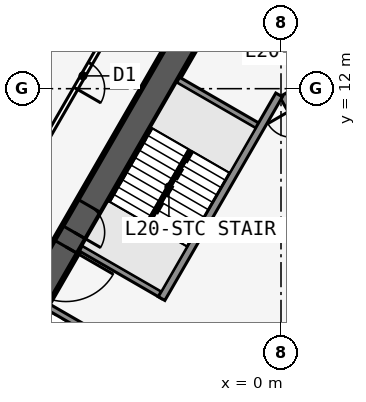
"""IFC4 building model, lengths in metres.
Left out: names, types, materials, properties, quantities, classifications, styles, units other than length and angle.
Written with IfcOpenShell. Run it as: python <this file> out.ifc"""

import sys

from ifc_helpers import new_model, si_unit, direction, frame, frame_2d, origin, place, context, subcontext, project, spatial, rectangle, extrude, element, fill, save


model = new_model("IFC4")
c1 = context("Model", 3, precision=1e-05, world=origin(), true_north=direction((0.0, 1.0)))
c2 = subcontext(c1, "Body", "Model", "MODEL_VIEW")
j1 = project(units=[si_unit("LENGTHUNIT", "METRE"), si_unit("PLANEANGLEUNIT", "RADIAN")], contexts=[c1])
p1 = place(None, origin())
s1 = spatial("IfcSite", under=j1, at=p1, CompositionType="ELEMENT")
p2 = place(p1, origin())
s2 = spatial("IfcBuilding", under=s1, at=p2, CompositionType="ELEMENT")
p3 = place(p2, frame((0.0, 0.0, 79.5)))
s3 = spatial("IfcBuildingStorey", under=s2, at=p3, CompositionType="ELEMENT", Elevation=79.5)
p4 = place(p3, frame((16.5, -9.526, 0.0), z_axis=(0.0, 0.0, 1.0), x_axis=(-0.499999749417, 0.866025548458, 0.0)))
e1 = element("IfcWall", 1, at=p4, inside=s3, PredefinedType="SHEAR", context=c2, shape_type="SweptSolid", body=[
    extrude(rectangle(XDim=33.0, YDim=0.9, at=frame_2d((16.5, 0.0))), origin(), (0.0, 0.0, 1.0), 3.4),
])
p5 = place(p4, frame((14.15, 0.0, 0.0)))
e2 = element("IfcOpeningElement", 2, at=p5, cuts=e1, PredefinedType="OPENING", context=c2, shape_type="SweptSolid", body=[
    extrude(rectangle(XDim=1.8, YDim=2.13, at=frame_2d((0.9, 1.065))), frame((0.0, 0.46, 0.0), z_axis=(0.0, -1.0, 0.0), x_axis=(1.0, 0.0, 0.0)), (0.0, 0.0, 1.0), 0.92),
])
p6 = place(p4, frame((12.6, 0.0, 0.0)))
e3 = element("IfcOpeningElement", 3, at=p6, cuts=e1, PredefinedType="OPENING", context=c2, shape_type="SweptSolid", body=[
    extrude(rectangle(XDim=1.0, YDim=2.13, at=frame_2d((0.5, 1.065))), frame((0.0, 0.46, 0.0), z_axis=(0.0, -1.0, 0.0), x_axis=(1.0, 0.0, 0.0)), (0.0, 0.0, 1.0), 0.92),
])
p7 = place(p3, frame((5.379, 2.586, 0.0), z_axis=(0.0, 0.0, 1.0), x_axis=(-0.500001375892, 0.866024609411, 0.0)))
e4 = element("IfcWall", 4, at=p7, inside=s3, PredefinedType="SOLIDWALL", context=c2, shape_type="SweptSolid", body=[
    extrude(rectangle(XDim=10.633, YDim=0.25, at=frame_2d((5.316, 0.0))), origin(), (0.0, 0.0, 1.0), 3.235),
])
p8 = place(p7, frame((9.164, 0.0, 0.0)))
e5 = element("IfcOpeningElement", 5, at=p8, cuts=e4, PredefinedType="OPENING", context=c2, shape_type="SweptSolid", body=[
    extrude(rectangle(XDim=0.9, YDim=2.13, at=frame_2d((0.45, 1.065))), frame((0.0, 0.135, 0.0), z_axis=(0.0, -1.0, 0.0), x_axis=(1.0, 0.0, 0.0)), (0.0, 0.0, 1.0), 0.27),
])
p9 = place(p7, frame((1.0, 0.0, 0.0)))
e6 = element("IfcOpeningElement", 6, at=p9, cuts=e4, PredefinedType="OPENING", context=c2, shape_type="SweptSolid", body=[
    extrude(rectangle(XDim=1.1, YDim=2.13, at=frame_2d((0.55, 1.065))), frame((0.0, 0.135, 0.0), z_axis=(0.0, -1.0, 0.0), x_axis=(1.0, 0.0, 0.0)), (0.0, 0.0, 1.0), 0.27),
])
p10 = place(p7, frame((3.9, 0.0, 0.0)))
e7 = element("IfcOpeningElement", 7, at=p10, cuts=e4, PredefinedType="OPENING", context=c2, shape_type="SweptSolid", body=[
    extrude(rectangle(XDim=1.1, YDim=2.13, at=frame_2d((0.55, 1.065))), frame((0.0, 0.135, 0.0), z_axis=(0.0, -1.0, 0.0), x_axis=(1.0, 0.0, 0.0)), (0.0, 0.0, 1.0), 0.27),
])
p11 = place(p7, frame((6.8, 0.0, 0.0)))
e8 = element("IfcOpeningElement", 8, at=p11, cuts=e4, PredefinedType="OPENING", context=c2, shape_type="SweptSolid", body=[
    extrude(rectangle(XDim=1.1, YDim=2.13, at=frame_2d((0.55, 1.065))), frame((0.0, 0.135, 0.0), z_axis=(0.0, -1.0, 0.0), x_axis=(1.0, 0.0, 0.0)), (0.0, 0.0, 1.0), 0.27),
])
p12 = place(p3, frame((0.0, 19.052, 0.0), z_axis=(0.0, 0.0, 1.0), x_axis=(-0.499999749417, -0.866025548458, 0.0)))
e9 = element("IfcWall", 9, at=p12, inside=s3, PredefinedType="SHEAR", context=c2, shape_type="SweptSolid", body=[
    extrude(rectangle(XDim=33.0, YDim=0.9, at=frame_2d((16.5, 0.0))), origin(), (0.0, 0.0, 1.0), 3.4),
])
p13 = place(p12, frame((14.15, 0.0, 0.0)))
e10 = element("IfcOpeningElement", 10, at=p13, cuts=e9, PredefinedType="OPENING", context=c2, shape_type="SweptSolid", body=[
    extrude(rectangle(XDim=1.8, YDim=2.13, at=frame_2d((0.9, 1.065))), frame((0.0, 0.46, 0.0), z_axis=(0.0, -1.0, 0.0), x_axis=(1.0, 0.0, 0.0)), (0.0, 0.0, 1.0), 0.92),
])
p14 = place(p12, frame((12.6, 0.0, 0.0)))
e11 = element("IfcOpeningElement", 11, at=p14, cuts=e9, PredefinedType="OPENING", context=c2, shape_type="SweptSolid", body=[
    extrude(rectangle(XDim=1.0, YDim=2.13, at=frame_2d((0.5, 1.065))), frame((0.0, 0.46, 0.0), z_axis=(0.0, -1.0, 0.0), x_axis=(1.0, 0.0, 0.0)), (0.0, 0.0, 1.0), 0.92),
])
p15 = place(p3, frame((-0.062, 11.794, 0.0), z_axis=(0.0, 0.0, 1.0), x_axis=(-0.500006680225, -0.86602154692, 0.0)))
e12 = element("IfcWall", 12, at=p15, inside=s3, PredefinedType="SOLIDWALL", context=c2, shape_type="SweptSolid", body=[
    extrude(rectangle(XDim=7.733, YDim=0.25, at=frame_2d((3.866, 0.0))), origin(), (0.0, 0.0, 1.0), 3.235),
])
for number, where, z_axis, x_axis in (
    (13, (-0.679, 10.727, 0.0), (0.0, 0.0, 1.0), (-0.866, 0.5, 0.0)),
    (14, (-3.879, 5.184, 0.0), (0.0, 0.0, 1.0), (-0.866, 0.5, 0.0)),
    (15, (-4.979, 3.279, 0.0), (0.0, 0.0, 1.0), (-0.866, 0.5, 0.0)),
):
    element("IfcWall", number, at=place(p3, frame(where, z_axis=z_axis, x_axis=x_axis)), inside=s3, PredefinedType="SOLIDWALL", context=c2, shape_type="SweptSolid", body=[
        extrude(rectangle(XDim=3.125, YDim=0.2, at=frame_2d((1.562, 0.0))), origin(), (0.0, 0.0, 1.0), 3.235),
    ])
p16 = place(p3, frame((-0.5, 22.836, 0.0), z_axis=(0.0, 0.0, 1.0), x_axis=(-0.500001677587, -0.866024435227, 0.0)))
e16 = element("IfcWall", 16, at=p16, inside=s3, PredefinedType="PARTITIONING", context=c2, shape_type="SweptSolid", body=[
    extrude(rectangle(XDim=39.054, YDim=0.15, at=frame_2d((19.527, 0.0))), origin(), (0.0, 0.0, 1.0), 3.235),
])
p17 = place(p16, frame((0.352, 0.0, 0.0)))
e17 = element("IfcOpeningElement", 17, at=p17, cuts=e16, PredefinedType="OPENING", context=c2, shape_type="SweptSolid", body=[
    extrude(rectangle(XDim=0.95, YDim=2.13, at=frame_2d((0.475, 1.065))), frame((0.0, 0.085, 0.0), z_axis=(0.0, -1.0, 0.0), x_axis=(1.0, 0.0, 0.0)), (0.0, 0.0, 1.0), 0.17),
])
p18 = place(p16, frame((11.552, 0.0, 0.0)))
e18 = element("IfcOpeningElement", 18, at=p18, cuts=e16, PredefinedType="OPENING", context=c2, shape_type="SweptSolid", body=[
    extrude(rectangle(XDim=0.95, YDim=2.13, at=frame_2d((0.475, 1.065))), frame((0.0, 0.085, 0.0), z_axis=(0.0, -1.0, 0.0), x_axis=(1.0, 0.0, 0.0)), (0.0, 0.0, 1.0), 0.17),
])
p19 = place(p16, frame((21.552, 0.0, 0.0)))
e19 = element("IfcOpeningElement", 19, at=p19, cuts=e16, PredefinedType="OPENING", context=c2, shape_type="SweptSolid", body=[
    extrude(rectangle(XDim=0.95, YDim=2.13, at=frame_2d((0.475, 1.065))), frame((0.0, 0.085, 0.0), z_axis=(0.0, -1.0, 0.0), x_axis=(1.0, 0.0, 0.0)), (0.0, 0.0, 1.0), 0.17),
])
p20 = place(p16, frame((36.546, 0.0, 0.0)))
e20 = element("IfcOpeningElement", 20, at=p20, cuts=e16, PredefinedType="OPENING", context=c2, shape_type="SweptSolid", body=[
    extrude(rectangle(XDim=0.95, YDim=2.13, at=frame_2d((0.475, 1.065))), frame((0.0, 0.085, 0.0), z_axis=(0.0, -1.0, 0.0), x_axis=(1.0, 0.0, 0.0)), (0.0, 0.0, 1.0), 0.17),
])
p21 = place(p3, frame((-2.988, 9.978, 0.0), z_axis=(0.0, 0.0, 1.0), x_axis=(-0.499992232847, -0.866029888106, 0.0)))
e21 = element("IfcWall", 21, at=p21, inside=s3, PredefinedType="SOLIDWALL", context=c2, shape_type="SweptSolid", body=[
    extrude(rectangle(XDim=2.794, YDim=0.1, at=frame_2d((1.397, 0.0))), origin(), (0.0, 0.0, 1.0), 3.4),
])
p22 = place(p18, origin())
e22 = element("IfcDoor", 22, at=p22, inside=s3, OperationType="SINGLE_SWING_RIGHT", PredefinedType="DOOR", context=c2, shape_type="SweptSolid", body=[
    extrude(rectangle(XDim=0.95, YDim=2.13, at=frame_2d((0.475, 1.065))), frame((0.0, 0.025, 0.0), z_axis=(0.0, -1.0, 0.0), x_axis=(1.0, 0.0, 0.0)), (0.0, 0.0, 1.0), 0.05),
])
fill(e18, e22)
p23 = place(p13, origin())
e23 = element("IfcDoor", 23, at=p23, inside=s3, OperationType="DOUBLE_DOOR_SINGLE_SWING", PredefinedType="DOOR", context=c2, shape_type="SweptSolid", body=[
    extrude(rectangle(XDim=1.8, YDim=2.13, at=frame_2d((0.9, 1.065))), frame((0.0, 0.025, 0.0), z_axis=(0.0, -1.0, 0.0), x_axis=(1.0, 0.0, 0.0)), (0.0, 0.0, 1.0), 0.05),
])
fill(e10, e23)
p24 = place(p14, origin())
e24 = element("IfcDoor", 24, at=p24, inside=s3, OperationType="SINGLE_SWING_RIGHT", PredefinedType="DOOR", context=c2, shape_type="SweptSolid", body=[
    extrude(rectangle(XDim=1.0, YDim=2.13, at=frame_2d((0.5, 1.065))), frame((0.0, 0.025, 0.0), z_axis=(0.0, -1.0, 0.0), x_axis=(1.0, 0.0, 0.0)), (0.0, 0.0, 1.0), 0.05),
])
fill(e11, e24)
save(model, sys.argv[1])
